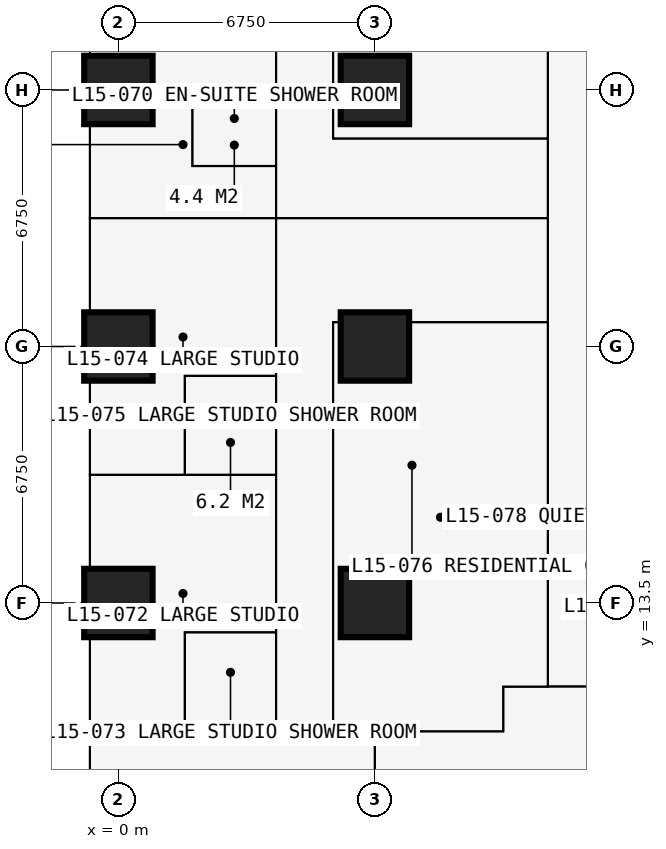
"""IFC4 building model, lengths in metres.
Left out: names, types, materials, properties, quantities, classifications, styles, units other than length and angle.
Written with IfcOpenShell. Run it as: python <this file> out.ifc"""

import sys

from ifc_helpers import new_model, si_unit, direction, frame, frame_2d, origin, origin_2d, place, context, subcontext, project, spatial, rectangle, extrude, element, fill, save


model = new_model("IFC4")
c1 = context("Model", 3, precision=1e-05, world=origin(), true_north=direction((0.0, 1.0)))
c2 = subcontext(c1, "Body", "Model", "MODEL_VIEW")
j1 = project(units=[si_unit("LENGTHUNIT", "METRE"), si_unit("PLANEANGLEUNIT", "RADIAN")], contexts=[c1])
p1 = place(None, origin())
s1 = spatial("IfcSite", under=j1, at=p1, CompositionType="ELEMENT")
p2 = place(p1, origin())
s2 = spatial("IfcBuilding", under=s1, at=p2, CompositionType="ELEMENT")
p3 = place(p2, frame((0.0, 0.0, 57.6)))
s3 = spatial("IfcBuildingStorey", under=s2, at=p3, CompositionType="ELEMENT", Elevation=57.6)
for number, where, z_axis, x_axis in (
    (1, (0.0, 13.5, 0.0), (0.0, 0.0, 1.0), (1.0, 0.0, 0.0)),
    (2, (0.0, 20.25, 0.0), (0.0, 0.0, 1.0), (1.0, 0.0, 0.0)),
    (3, (0.0, 27.0, 0.0), (0.0, 0.0, 1.0), (1.0, 0.0, 0.0)),
    (4, (6.75, 13.5, 0.0), (0.0, 0.0, 1.0), (1.0, 0.0, 0.0)),
    (5, (6.75, 20.25, 0.0), (0.0, 0.0, 1.0), (1.0, 0.0, 0.0)),
    (6, (6.75, 27.0, 0.0), (0.0, 0.0, 1.0), (1.0, 0.0, 0.0)),
):
    element("IfcColumn", number, at=place(p3, frame(where, z_axis=z_axis, x_axis=x_axis)), inside=s3, PredefinedType="COLUMN", context=c2, shape_type="SweptSolid", body=[
        extrude(rectangle(XDim=1.8, YDim=1.8, at=origin_2d()), origin(), (0.0, 0.0, 1.0), 3.6),
    ])
p4 = place(p3, frame((-0.75, 20.25, 0.0), z_axis=(0.0, 0.0, 1.0), x_axis=(0.0, 1.0, 0.0)))
e7 = element("IfcWall", 7, at=p4, inside=s3, PredefinedType="SOLIDWALL", context=c2, shape_type="SweptSolid", body=[
    extrude(rectangle(XDim=6.75, YDim=0.15, at=frame_2d((3.375, 0.0))), origin(), (0.0, 0.0, 1.0), 3.375),
])
p5 = place(p4, frame((0.962, 0.0, 0.0)))
e8 = element("IfcOpeningElement", 8, at=p5, cuts=e7, PredefinedType="OPENING", context=c2, shape_type="SweptSolid", body=[
    extrude(rectangle(XDim=1.0, YDim=2.2, at=frame_2d((0.5, 1.1))), frame((0.0, 0.085, 0.0), z_axis=(0.0, -1.0, 0.0), x_axis=(1.0, 0.0, 0.0)), (0.0, 0.0, 1.0), 0.17),
])
p6 = place(p4, frame((2.025, 0.0, 0.9)))
e9 = element("IfcOpeningElement", 9, at=p6, cuts=e7, PredefinedType="OPENING", context=c2, shape_type="SweptSolid", body=[
    extrude(rectangle(XDim=1.2, YDim=1.8, at=frame_2d((0.6, 0.9))), frame((0.0, 0.085, 0.0), z_axis=(0.0, -1.0, 0.0), x_axis=(1.0, 0.0, 0.0)), (0.0, 0.0, 1.0), 0.17),
])
p7 = place(p4, frame((4.788, 0.0, 0.0)))
e10 = element("IfcOpeningElement", 10, at=p7, cuts=e7, PredefinedType="OPENING", context=c2, shape_type="SweptSolid", body=[
    extrude(rectangle(XDim=1.0, YDim=2.2, at=frame_2d((0.5, 1.1))), frame((0.0, 0.085, 0.0), z_axis=(0.0, -1.0, 0.0), x_axis=(1.0, 0.0, 0.0)), (0.0, 0.0, 1.0), 0.17),
])
p8 = place(p4, frame((3.525, 0.0, 0.9)))
e11 = element("IfcOpeningElement", 11, at=p8, cuts=e7, PredefinedType="OPENING", context=c2, shape_type="SweptSolid", body=[
    extrude(rectangle(XDim=1.2, YDim=1.8, at=frame_2d((0.6, 0.9))), frame((0.0, 0.085, 0.0), z_axis=(0.0, -1.0, 0.0), x_axis=(1.0, 0.0, 0.0)), (0.0, 0.0, 1.0), 0.17),
])
p9 = place(p3, frame((-0.85, 23.625, 0.0), z_axis=(0.0, 0.0, 1.0), x_axis=(-1.0, 0.0, 0.0)))
e12 = element("IfcWall", 12, at=p9, inside=s3, PredefinedType="USERDEFINED", context=c2, shape_type="SweptSolid", body=[
    extrude(rectangle(XDim=2.2, YDim=1.0, at=frame_2d((1.1, 0.0))), origin(), (0.0, 0.0, 1.0), 0.9),
])
p10 = place(p3, frame((-0.734, 10.125, 0.0), z_axis=(0.0, 0.0, 1.0), x_axis=(1.0, 0.0, 0.0)))
e13 = element("IfcWall", 13, at=p10, inside=s3, PredefinedType="PARTITIONING", context=c2, shape_type="SweptSolid", body=[
    extrude(rectangle(XDim=10.859, YDim=0.15, at=frame_2d((5.429, 0.0))), origin(), (0.0, 0.0, 1.0), 3.375),
])
p11 = place(p3, frame((-0.734, 16.875, 0.0), z_axis=(0.0, 0.0, 1.0), x_axis=(1.0, 0.0, 0.0)))
e14 = element("IfcWall", 14, at=p11, inside=s3, PredefinedType="PARTITIONING", context=c2, shape_type="SweptSolid", body=[
    extrude(rectangle(XDim=4.884, YDim=0.175, at=frame_2d((2.442, 0.0))), origin(), (0.0, 0.0, 1.0), 3.375),
])
p12 = place(p11, frame((3.234, 0.0, 0.0)))
e15 = element("IfcOpeningElement", 15, at=p12, cuts=e14, PredefinedType="OPENING", context=c2, shape_type="SweptSolid", body=[
    extrude(rectangle(XDim=0.9, YDim=2.2, at=frame_2d((0.45, 1.1))), frame((0.0, 0.097, 0.0), z_axis=(0.0, -1.0, 0.0), x_axis=(1.0, 0.0, 0.0)), (0.0, 0.0, 1.0), 0.195),
])
p13 = place(p3, frame((-0.734, 23.625, 0.0), z_axis=(0.0, 0.0, 1.0), x_axis=(1.0, 0.0, 0.0)))
e16 = element("IfcWall", 16, at=p13, inside=s3, PredefinedType="PARTITIONING", context=c2, shape_type="SweptSolid", body=[
    extrude(rectangle(XDim=12.034, YDim=0.15, at=frame_2d((6.017, 0.0))), origin(), (0.0, 0.0, 1.0), 3.375),
])
p14 = place(p3, frame((-0.734, 27.0, 0.0), z_axis=(0.0, 0.0, 1.0), x_axis=(1.0, 0.0, 0.0)))
e17 = element("IfcWall", 17, at=p14, inside=s3, PredefinedType="PARTITIONING", context=c2, shape_type="SweptSolid", body=[
    extrude(rectangle(XDim=4.884, YDim=0.15, at=frame_2d((2.442, 0.0))), origin(), (0.0, 0.0, 1.0), 2.877),
])
p15 = place(p3, frame((1.75, 10.125, 0.0), z_axis=(0.0, 0.0, 1.0), x_axis=(0.0, 1.0, 0.0)))
e18 = element("IfcWall", 18, at=p15, inside=s3, PredefinedType="PARTITIONING", context=c2, shape_type="SweptSolid", body=[
    extrude(rectangle(XDim=2.6, YDim=0.1, at=frame_2d((1.3, 0.0))), origin(), (0.0, 0.0, 1.0), 3.375),
])
p16 = place(p15, frame((0.85, 0.0, 0.0)))
e19 = element("IfcOpeningElement", 19, at=p16, cuts=e18, PredefinedType="OPENING", context=c2, shape_type="SweptSolid", body=[
    extrude(rectangle(XDim=0.9, YDim=2.2, at=frame_2d((0.45, 1.1))), frame((0.0, 0.06, 0.0), z_axis=(0.0, -1.0, 0.0), x_axis=(1.0, 0.0, 0.0)), (0.0, 0.0, 1.0), 0.12),
])
p17 = place(p3, frame((1.75, 12.725, 0.0), z_axis=(0.0, 0.0, 1.0), x_axis=(1.0, 0.0, 0.0)))
e20 = element("IfcWall", 20, at=p17, inside=s3, PredefinedType="PARTITIONING", context=c2, shape_type="SweptSolid", body=[
    extrude(rectangle(XDim=2.4, YDim=0.1, at=frame_2d((1.2, 0.0))), origin(), (0.0, 0.0, 1.0), 3.375),
])
p18 = place(p3, frame((1.75, 16.875, 0.0), z_axis=(0.0, 0.0, 1.0), x_axis=(0.0, 1.0, 0.0)))
e21 = element("IfcWall", 21, at=p18, inside=s3, PredefinedType="PARTITIONING", context=c2, shape_type="SweptSolid", body=[
    extrude(rectangle(XDim=2.6, YDim=0.1, at=frame_2d((1.3, 0.0))), origin(), (0.0, 0.0, 1.0), 3.375),
])
p19 = place(p3, frame((1.75, 19.475, 0.0), z_axis=(0.0, 0.0, 1.0), x_axis=(1.0, 0.0, 0.0)))
e22 = element("IfcWall", 22, at=p19, inside=s3, PredefinedType="PARTITIONING", context=c2, shape_type="SweptSolid", body=[
    extrude(rectangle(XDim=2.4, YDim=0.1, at=frame_2d((1.2, 0.0))), origin(), (0.0, 0.0, 1.0), 3.375),
])
p20 = place(p3, frame((1.95, 25.0, 0.0), z_axis=(0.0, 0.0, 1.0), x_axis=(0.0, 1.0, 0.0)))
e23 = element("IfcWall", 23, at=p20, inside=s3, PredefinedType="PARTITIONING", context=c2, shape_type="SweptSolid", body=[
    extrude(rectangle(XDim=2.0, YDim=0.1, at=frame_2d((1.0, 0.0))), origin(), (0.0, 0.0, 1.0), 3.375),
])
p21 = place(p3, frame((1.95, 25.0, 0.0), z_axis=(0.0, 0.0, 1.0), x_axis=(1.0, 0.0, 0.0)))
e24 = element("IfcWall", 24, at=p21, inside=s3, PredefinedType="PARTITIONING", context=c2, shape_type="SweptSolid", body=[
    extrude(rectangle(XDim=2.2, YDim=0.1, at=frame_2d((1.1, 0.0))), origin(), (0.0, 0.0, 1.0), 3.375),
])
p22 = place(p21, frame((0.65, 0.0, 0.0)))
e25 = element("IfcOpeningElement", 25, at=p22, cuts=e24, PredefinedType="OPENING", context=c2, shape_type="SweptSolid", body=[
    extrude(rectangle(XDim=0.9, YDim=2.2, at=frame_2d((0.45, 1.1))), frame((0.0, 0.06, 0.0), z_axis=(0.0, -1.0, 0.0), x_axis=(1.0, 0.0, 0.0)), (0.0, 0.0, 1.0), 0.12),
])
p23 = place(p3, frame((4.15, 10.125, 0.0), z_axis=(0.0, 0.0, 1.0), x_axis=(0.0, 1.0, 0.0)))
e26 = element("IfcWall", 26, at=p23, inside=s3, PredefinedType="PARTITIONING", context=c2, shape_type="SweptSolid", body=[
    extrude(rectangle(XDim=23.625, YDim=0.15, at=frame_2d((11.812, 0.0))), origin(), (0.0, 0.0, 1.0), 3.375),
])
p24 = place(p23, frame((19.775, 0.0, 0.0)))
e27 = element("IfcOpeningElement", 27, at=p24, cuts=e26, PredefinedType="OPENING", context=c2, shape_type="SweptSolid", body=[
    extrude(rectangle(XDim=1.0, YDim=2.2, at=frame_2d((0.5, 1.1))), frame((0.0, 0.085, 0.0), z_axis=(0.0, -1.0, 0.0), x_axis=(1.0, 0.0, 0.0)), (0.0, 0.0, 1.0), 0.17),
])
p25 = place(p23, frame((13.7, 0.0, 0.0)))
e28 = element("IfcOpeningElement", 28, at=p25, cuts=e26, PredefinedType="OPENING", context=c2, shape_type="SweptSolid", body=[
    extrude(rectangle(XDim=0.95, YDim=2.2, at=frame_2d((0.475, 1.1))), frame((0.0, 0.085, 0.0), z_axis=(0.0, -1.0, 0.0), x_axis=(1.0, 0.0, 0.0)), (0.0, 0.0, 1.0), 0.17),
])
p26 = place(p23, frame((4.2, 0.0, 0.0)))
e29 = element("IfcOpeningElement", 29, at=p26, cuts=e26, PredefinedType="OPENING", context=c2, shape_type="SweptSolid", body=[
    extrude(rectangle(XDim=0.95, YDim=2.2, at=frame_2d((0.475, 1.1))), frame((0.0, 0.085, 0.0), z_axis=(0.0, -1.0, 0.0), x_axis=(1.0, 0.0, 0.0)), (0.0, 0.0, 1.0), 0.17),
])
p27 = place(p23, frame((10.95, 0.0, 0.0)))
e30 = element("IfcOpeningElement", 30, at=p27, cuts=e26, PredefinedType="OPENING", context=c2, shape_type="SweptSolid", body=[
    extrude(rectangle(XDim=0.95, YDim=2.2, at=frame_2d((0.475, 1.1))), frame((0.0, 0.085, 0.0), z_axis=(0.0, -1.0, 0.0), x_axis=(1.0, 0.0, 0.0)), (0.0, 0.0, 1.0), 0.17),
])
p28 = place(p3, frame((5.65, 10.125, 0.0), z_axis=(0.0, 0.0, 1.0), x_axis=(0.0, 1.0, 0.0)))
e31 = element("IfcWall", 31, at=p28, inside=s3, PredefinedType="PARTITIONING", context=c2, shape_type="SweptSolid", body=[
    extrude(rectangle(XDim=10.762, YDim=0.15, at=frame_2d((5.381, 0.0))), origin(), (0.0, 0.0, 1.0), 3.375),
])
p29 = place(p28, frame((4.9, 0.0, 0.0)))
e32 = element("IfcOpeningElement", 32, at=p29, cuts=e31, PredefinedType="OPENING", context=c2, shape_type="SweptSolid", body=[
    extrude(rectangle(XDim=0.95, YDim=2.2, at=frame_2d((0.475, 1.1))), frame((0.0, 0.085, 0.0), z_axis=(0.0, -1.0, 0.0), x_axis=(1.0, 0.0, 0.0)), (0.0, 0.0, 1.0), 0.17),
])
p30 = place(p3, frame((5.65, 20.887, 0.0), z_axis=(0.0, 0.0, 1.0), x_axis=(1.0, 0.0, 0.0)))
e33 = element("IfcWall", 33, at=p30, inside=s3, PredefinedType="PARTITIONING", context=c2, shape_type="SweptSolid", body=[
    extrude(rectangle(XDim=5.65, YDim=0.15, at=frame_2d((2.825, 0.0))), origin(), (0.0, 0.0, 1.0), 3.375),
])
p31 = place(p3, frame((5.65, 25.725, 0.0), z_axis=(0.0, 0.0, 1.0), x_axis=(0.0, 1.0, 0.0)))
e34 = element("IfcWall", 34, at=p31, inside=s3, PredefinedType="PARTITIONING", context=c2, shape_type="SweptSolid", body=[
    extrude(rectangle(XDim=8.025, YDim=0.15, at=frame_2d((4.012, 0.0))), origin(), (0.0, 0.0, 1.0), 3.375),
])
p32 = place(p3, frame((5.65, 25.725, 0.0), z_axis=(0.0, 0.0, 1.0), x_axis=(1.0, 0.0, 0.0)))
e35 = element("IfcWall", 35, at=p32, inside=s3, PredefinedType="PARTITIONING", context=c2, shape_type="SweptSolid", body=[
    extrude(rectangle(XDim=5.65, YDim=0.15, at=frame_2d((2.825, 0.0))), origin(), (0.0, 0.0, 1.0), 3.375),
])
p33 = place(p3, frame((6.75, 4.15, 0.0), z_axis=(0.0, 0.0, 1.0), x_axis=(0.0, 1.0, 0.0)))
e36 = element("IfcWall", 36, at=p33, inside=s3, PredefinedType="PARTITIONING", context=c2, shape_type="SweptSolid", body=[
    extrude(rectangle(XDim=5.975, YDim=0.15, at=frame_2d((2.988, 0.0))), origin(), (0.0, 0.0, 1.0), 2.877),
])
p34 = place(p3, frame((10.125, 10.125, 0.0), z_axis=(0.0, 0.0, 1.0), x_axis=(0.0, 1.0, 0.0)))
e37 = element("IfcWall", 37, at=p34, inside=s3, PredefinedType="PARTITIONING", context=c2, shape_type="SweptSolid", body=[
    extrude(rectangle(XDim=1.175, YDim=0.15, at=frame_2d((0.587, 0.0))), origin(), (0.0, 0.0, 1.0), 3.375),
])
p35 = place(p3, frame((10.125, 11.3, 0.0), z_axis=(0.0, 0.0, 1.0), x_axis=(1.0, 0.0, 0.0)))
e38 = element("IfcWall", 38, at=p35, inside=s3, PredefinedType="PARTITIONING", context=c2, shape_type="SweptSolid", body=[
    extrude(rectangle(XDim=20.675, YDim=0.15, at=frame_2d((10.337, 0.0))), origin(), (0.0, 0.0, 1.0), 3.375),
])
p36 = place(p35, frame((8.375, 0.0, 0.0)))
e39 = element("IfcOpeningElement", 39, at=p36, cuts=e38, PredefinedType="OPENING", context=c2, shape_type="SweptSolid", body=[
    extrude(rectangle(XDim=1.0, YDim=2.2, at=frame_2d((0.5, 1.1))), frame((0.0, 0.085, 0.0), z_axis=(0.0, -1.0, 0.0), x_axis=(1.0, 0.0, 0.0)), (0.0, 0.0, 1.0), 0.17),
])
p37 = place(p35, frame((10.975, 0.0, 0.0)))
e40 = element("IfcOpeningElement", 40, at=p37, cuts=e38, PredefinedType="OPENING", context=c2, shape_type="SweptSolid", body=[
    extrude(rectangle(XDim=1.0, YDim=2.2, at=frame_2d((0.5, 1.1))), frame((0.0, 0.085, 0.0), z_axis=(0.0, -1.0, 0.0), x_axis=(1.0, 0.0, 0.0)), (0.0, 0.0, 1.0), 0.17),
])
p38 = place(p35, frame((3.925, 0.0, 0.0)))
e41 = element("IfcOpeningElement", 41, at=p38, cuts=e38, PredefinedType="OPENING", context=c2, shape_type="SweptSolid", body=[
    extrude(rectangle(XDim=0.95, YDim=2.2, at=frame_2d((0.475, 1.1))), frame((0.0, 0.085, 0.0), z_axis=(0.0, -1.0, 0.0), x_axis=(1.0, 0.0, 0.0)), (0.0, 0.0, 1.0), 0.17),
])
p39 = place(p3, frame((11.3, 11.3, 0.0), z_axis=(0.0, 0.0, 1.0), x_axis=(0.0, 1.0, 0.0)))
e42 = element("IfcWall", 42, at=p39, inside=s3, PredefinedType="PARTITIONING", context=c2, shape_type="SweptSolid", body=[
    extrude(rectangle(XDim=19.075, YDim=0.15, at=frame_2d((9.538, 0.0))), origin(), (0.0, 0.0, 1.0), 3.375),
])
p40 = place(p39, frame((12.875, 0.0, 0.0)))
e43 = element("IfcOpeningElement", 43, at=p40, cuts=e42, PredefinedType="OPENING", context=c2, shape_type="SweptSolid", body=[
    extrude(rectangle(XDim=1.0, YDim=2.2, at=frame_2d((0.5, 1.1))), frame((0.0, 0.085, 0.0), z_axis=(0.0, -1.0, 0.0), x_axis=(1.0, 0.0, 0.0)), (0.0, 0.0, 1.0), 0.17),
])
p41 = place(p39, frame((10.438, 0.0, 0.0)))
e44 = element("IfcOpeningElement", 44, at=p41, cuts=e42, PredefinedType="OPENING", context=c2, shape_type="SweptSolid", body=[
    extrude(rectangle(XDim=1.0, YDim=2.2, at=frame_2d((0.5, 1.1))), frame((0.0, 0.085, 0.0), z_axis=(0.0, -1.0, 0.0), x_axis=(1.0, 0.0, 0.0)), (0.0, 0.0, 1.0), 0.17),
])
p42 = place(p39, frame((15.675, 0.0, 0.0)))
e45 = element("IfcOpeningElement", 45, at=p42, cuts=e42, PredefinedType="OPENING", context=c2, shape_type="SweptSolid", body=[
    extrude(rectangle(XDim=0.95, YDim=2.2, at=frame_2d((0.475, 1.1))), frame((0.0, 0.085, 0.0), z_axis=(0.0, -1.0, 0.0), x_axis=(1.0, 0.0, 0.0)), (0.0, 0.0, 1.0), 0.17),
])
p43 = place(p5, origin())
e46 = element("IfcDoor", 46, at=p43, inside=s3, OperationType="SINGLE_SWING_LEFT", PredefinedType="DOOR", context=c2, shape_type="SweptSolid", body=[
    extrude(rectangle(XDim=1.0, YDim=2.2, at=frame_2d((0.5, 1.1))), frame((0.0, 0.025, 0.0), z_axis=(0.0, -1.0, 0.0), x_axis=(1.0, 0.0, 0.0)), (0.0, 0.0, 1.0), 0.05),
])
fill(e8, e46)
p44 = place(p6, origin())
e47 = element("IfcWindow", 47, at=p44, inside=s3, PartitioningType="SINGLE_PANEL", PredefinedType="WINDOW", context=c2, shape_type="SweptSolid", body=[
    extrude(rectangle(XDim=1.2, YDim=1.8, at=frame_2d((0.6, 0.9))), frame((0.0, 0.03, 0.0), z_axis=(0.0, -1.0, 0.0), x_axis=(1.0, 0.0, 0.0)), (0.0, 0.0, 1.0), 0.06),
])
fill(e9, e47)
p45 = place(p7, origin())
e48 = element("IfcDoor", 48, at=p45, inside=s3, OperationType="SINGLE_SWING_RIGHT", PredefinedType="DOOR", context=c2, shape_type="SweptSolid", body=[
    extrude(rectangle(XDim=1.0, YDim=2.2, at=frame_2d((0.5, 1.1))), frame((0.0, 0.025, 0.0), z_axis=(0.0, -1.0, 0.0), x_axis=(1.0, 0.0, 0.0)), (0.0, 0.0, 1.0), 0.05),
])
fill(e10, e48)
p46 = place(p8, origin())
e49 = element("IfcWindow", 49, at=p46, inside=s3, PartitioningType="SINGLE_PANEL", PredefinedType="WINDOW", context=c2, shape_type="SweptSolid", body=[
    extrude(rectangle(XDim=1.2, YDim=1.8, at=frame_2d((0.6, 0.9))), frame((0.0, 0.03, 0.0), z_axis=(0.0, -1.0, 0.0), x_axis=(1.0, 0.0, 0.0)), (0.0, 0.0, 1.0), 0.06),
])
fill(e11, e49)
p47 = place(p25, origin())
e50 = element("IfcDoor", 50, at=p47, inside=s3, OperationType="SINGLE_SWING_LEFT", PredefinedType="DOOR", context=c2, shape_type="SweptSolid", body=[
    extrude(rectangle(XDim=0.95, YDim=2.2, at=frame_2d((0.475, 1.1))), frame((0.0, 0.025, 0.0), z_axis=(0.0, -1.0, 0.0), x_axis=(1.0, 0.0, 0.0)), (0.0, 0.0, 1.0), 0.05),
])
fill(e28, e50)
p48 = place(p22, origin())
e51 = element("IfcDoor", 51, at=p48, inside=s3, OperationType="SINGLE_SWING_RIGHT", PredefinedType="DOOR", context=c2, shape_type="SweptSolid", body=[
    extrude(rectangle(XDim=0.9, YDim=2.2, at=frame_2d((0.45, 1.1))), frame((0.0, 0.025, 0.0), z_axis=(0.0, -1.0, 0.0), x_axis=(1.0, 0.0, 0.0)), (0.0, 0.0, 1.0), 0.05),
])
fill(e25, e51)
p49 = place(p40, origin())
e52 = element("IfcDoor", 52, at=p49, inside=s3, OperationType="SINGLE_SWING_LEFT", PredefinedType="DOOR", context=c2, shape_type="SweptSolid", body=[
    extrude(rectangle(XDim=1.0, YDim=2.2, at=frame_2d((0.5, 1.1))), frame((0.0, 0.025, 0.0), z_axis=(0.0, -1.0, 0.0), x_axis=(1.0, 0.0, 0.0)), (0.0, 0.0, 1.0), 0.05),
])
fill(e43, e52)
p50 = place(p26, origin())
e53 = element("IfcDoor", 53, at=p50, inside=s3, OperationType="SINGLE_SWING_LEFT", PredefinedType="DOOR", context=c2, shape_type="SweptSolid", body=[
    extrude(rectangle(XDim=0.95, YDim=2.2, at=frame_2d((0.475, 1.1))), frame((0.0, 0.025, 0.0), z_axis=(0.0, -1.0, 0.0), x_axis=(1.0, 0.0, 0.0)), (0.0, 0.0, 1.0), 0.05),
])
fill(e29, e53)
p51 = place(p16, origin())
e54 = element("IfcDoor", 54, at=p51, inside=s3, OperationType="SINGLE_SWING_RIGHT", PredefinedType="DOOR", context=c2, shape_type="SweptSolid", body=[
    extrude(rectangle(XDim=0.9, YDim=2.2, at=frame_2d((0.45, 1.1))), frame((0.0, 0.025, 0.0), z_axis=(0.0, -1.0, 0.0), x_axis=(1.0, 0.0, 0.0)), (0.0, 0.0, 1.0), 0.05),
])
fill(e19, e54)
p52 = place(p27, origin())
e55 = element("IfcDoor", 55, at=p52, inside=s3, OperationType="SINGLE_SWING_LEFT", PredefinedType="DOOR", context=c2, shape_type="SweptSolid", body=[
    extrude(rectangle(XDim=0.95, YDim=2.2, at=frame_2d((0.475, 1.1))), frame((0.0, 0.025, 0.0), z_axis=(0.0, -1.0, 0.0), x_axis=(1.0, 0.0, 0.0)), (0.0, 0.0, 1.0), 0.05),
])
fill(e30, e55)
p53 = place(p12, origin())
e56 = element("IfcDoor", 56, at=p53, inside=s3, OperationType="SINGLE_SWING_RIGHT", PredefinedType="DOOR", context=c2, shape_type="SweptSolid", body=[
    extrude(rectangle(XDim=0.9, YDim=2.2, at=frame_2d((0.45, 1.1))), frame((0.0, 0.025, 0.0), z_axis=(0.0, -1.0, 0.0), x_axis=(1.0, 0.0, 0.0)), (0.0, 0.0, 1.0), 0.05),
])
fill(e15, e56)
p54 = place(p41, origin())
e57 = element("IfcDoor", 57, at=p54, inside=s3, OperationType="SINGLE_SWING_LEFT", PredefinedType="DOOR", context=c2, shape_type="SweptSolid", body=[
    extrude(rectangle(XDim=1.0, YDim=2.2, at=frame_2d((0.5, 1.1))), frame((0.0, 0.025, 0.0), z_axis=(0.0, -1.0, 0.0), x_axis=(1.0, 0.0, 0.0)), (0.0, 0.0, 1.0), 0.05),
])
fill(e44, e57)
p55 = place(p42, origin())
e58 = element("IfcDoor", 58, at=p55, inside=s3, OperationType="SINGLE_SWING_LEFT", PredefinedType="DOOR", context=c2, shape_type="SweptSolid", body=[
    extrude(rectangle(XDim=0.95, YDim=2.2, at=frame_2d((0.475, 1.1))), frame((0.0, 0.025, 0.0), z_axis=(0.0, -1.0, 0.0), x_axis=(1.0, 0.0, 0.0)), (0.0, 0.0, 1.0), 0.05),
])
fill(e45, e58)
p56 = place(p29, origin())
e59 = element("IfcDoor", 59, at=p56, inside=s3, OperationType="SINGLE_SWING_LEFT", PredefinedType="DOOR", context=c2, shape_type="SweptSolid", body=[
    extrude(rectangle(XDim=0.95, YDim=2.2, at=frame_2d((0.475, 1.1))), frame((0.0, 0.025, 0.0), z_axis=(0.0, -1.0, 0.0), x_axis=(1.0, 0.0, 0.0)), (0.0, 0.0, 1.0), 0.05),
])
fill(e32, e59)
save(model, sys.argv[1])
